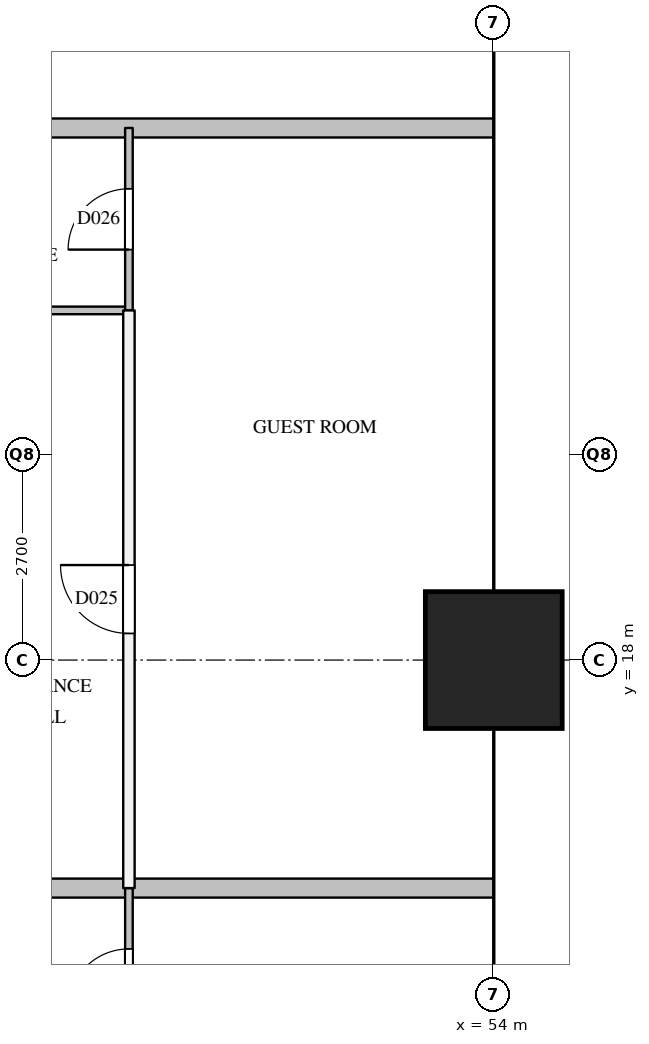
"""IFC4 building model, lengths in metres.
Left out: names, types, materials, properties, quantities, classifications, styles, units other than length and angle.
Written with IfcOpenShell. Run it as: python <this file> out.ifc"""

import sys

from ifc_helpers import new_model, si_unit, direction, frame, frame_2d, origin, origin_2d, place, context, subcontext, project, spatial, rectangle, extrude, element, fill, save


model = new_model("IFC4")
c1 = context("Model", 3, precision=1e-05, world=origin(), true_north=direction((0.0, 1.0)))
c2 = subcontext(c1, "Body", "Model", "MODEL_VIEW")
j1 = project(units=[si_unit("LENGTHUNIT", "METRE"), si_unit("PLANEANGLEUNIT", "RADIAN")], contexts=[c1])
p1 = place(None, origin())
s1 = spatial("IfcSite", under=j1, at=p1, CompositionType="ELEMENT")
p2 = place(p1, origin())
s2 = spatial("IfcBuilding", under=s1, at=p2, CompositionType="ELEMENT")
p3 = place(p2, frame((0.0, 0.0, 72.8)))
s3 = spatial("IfcBuildingStorey", under=s2, at=p3, CompositionType="ELEMENT", Elevation=72.8)
p4 = place(p3, frame((54.0, 18.0, 0.0), z_axis=(0.0, 0.0, 1.0), x_axis=(1.0, 0.0, 0.0)))
e1 = element("IfcColumn", 1, at=p4, inside=s3, PredefinedType="COLUMN", context=c2, shape_type="SweptSolid", body=[
    extrude(rectangle(XDim=1.8, YDim=1.8, at=origin_2d()), origin(), (0.0, 0.0, 1.0), 5.0),
])
p5 = place(p3, frame((49.2, 15.0, 0.0), z_axis=(0.0, 0.0, 1.0), x_axis=(0.0, 1.0, 0.0)))
e2 = element("IfcWall", 2, at=p5, inside=s3, PredefinedType="PARTITIONING", context=c2, shape_type="SweptSolid", body=[
    extrude(rectangle(XDim=7.6, YDim=0.15, at=frame_2d((3.8, 0.0))), origin(), (0.0, 0.0, 1.0), 4.7),
])
p6 = place(p5, frame((3.35, 0.0, 0.0)))
e3 = element("IfcOpeningElement", 3, at=p6, cuts=e2, PredefinedType="OPENING", context=c2, shape_type="SweptSolid", body=[
    extrude(rectangle(XDim=0.9, YDim=2.1, at=frame_2d((0.45, 1.05))), frame((0.0, 0.085, 0.0), z_axis=(0.0, -1.0, 0.0), x_axis=(1.0, 0.0, 0.0)), (0.0, 0.0, 1.0), 0.17),
])
p7 = place(p3, frame((46.8, 15.0, 0.0), z_axis=(0.0, 0.0, 1.0), x_axis=(1.0, 0.0, 0.0)))
e4 = element("IfcWall", 4, at=p7, inside=s3, PredefinedType="PARTITIONING", context=c2, shape_type="SweptSolid", body=[
    extrude(rectangle(XDim=7.2, YDim=0.25, at=frame_2d((3.6, 0.0))), origin(), (0.0, 0.0, 1.0), 3.7),
])
p8 = place(p3, frame((47.32, 25.0, 0.0), z_axis=(0.0, 0.0, 1.0), x_axis=(1.0, 0.0, 0.0)))
e5 = element("IfcWall", 5, at=p8, inside=s3, PredefinedType="PARTITIONING", context=c2, shape_type="SweptSolid", body=[
    extrude(rectangle(XDim=6.68, YDim=0.25, at=frame_2d((3.34, 0.0))), origin(), (0.0, 0.0, 1.0), 3.7),
])
p9 = place(p3, frame((46.8, 22.6, 0.0), z_axis=(0.0, 0.0, 1.0), x_axis=(1.0, 0.0, 0.0)))
e6 = element("IfcWall", 6, at=p9, inside=s3, PredefinedType="PARTITIONING", context=c2, shape_type="SweptSolid", body=[
    extrude(rectangle(XDim=2.4, YDim=0.1, at=frame_2d((1.2, 0.0))), origin(), (0.0, 0.0, 1.0), 4.7),
])
p10 = place(p3, frame((49.2, 12.6, 0.0), z_axis=(0.0, 0.0, 1.0), x_axis=(0.0, 1.0, 0.0)))
e7 = element("IfcWall", 7, at=p10, inside=s3, PredefinedType="PARTITIONING", context=c2, shape_type="SweptSolid", body=[
    extrude(rectangle(XDim=2.4, YDim=0.1, at=frame_2d((1.2, 0.0))), origin(), (0.0, 0.0, 1.0), 4.7),
])
p11 = place(p10, frame((0.8, 0.0, 0.0)))
e8 = element("IfcOpeningElement", 8, at=p11, cuts=e7, PredefinedType="OPENING", context=c2, shape_type="SweptSolid", body=[
    extrude(rectangle(XDim=0.8, YDim=2.1, at=frame_2d((0.4, 1.05))), frame((0.0, 0.06, 0.0), z_axis=(0.0, -1.0, 0.0), x_axis=(1.0, 0.0, 0.0)), (0.0, 0.0, 1.0), 0.12),
])
p12 = place(p3, frame((49.2, 22.6, 0.0), z_axis=(0.0, 0.0, 1.0), x_axis=(0.0, 1.0, 0.0)))
e9 = element("IfcWall", 9, at=p12, inside=s3, PredefinedType="PARTITIONING", context=c2, shape_type="SweptSolid", body=[
    extrude(rectangle(XDim=2.4, YDim=0.1, at=frame_2d((1.2, 0.0))), origin(), (0.0, 0.0, 1.0), 4.7),
])
p13 = place(p12, frame((0.8, 0.0, 0.0)))
e10 = element("IfcOpeningElement", 10, at=p13, cuts=e9, PredefinedType="OPENING", context=c2, shape_type="SweptSolid", body=[
    extrude(rectangle(XDim=0.8, YDim=2.1, at=frame_2d((0.4, 1.05))), frame((0.0, 0.06, 0.0), z_axis=(0.0, -1.0, 0.0), x_axis=(1.0, 0.0, 0.0)), (0.0, 0.0, 1.0), 0.12),
])
p14 = place(p11, origin())
e11 = element("IfcDoor", 11, at=p14, inside=s3, OperationType="SINGLE_SWING_LEFT", PredefinedType="DOOR", context=c2, shape_type="SweptSolid", body=[
    extrude(rectangle(XDim=0.8, YDim=2.1, at=frame_2d((0.4, 1.05))), frame((0.0, 0.025, 0.0), z_axis=(0.0, -1.0, 0.0), x_axis=(1.0, 0.0, 0.0)), (0.0, 0.0, 1.0), 0.05),
])
fill(e8, e11)
p15 = place(p6, origin())
e12 = element("IfcDoor", 12, at=p15, inside=s3, OperationType="SINGLE_SWING_RIGHT", PredefinedType="DOOR", context=c2, shape_type="SweptSolid", body=[
    extrude(rectangle(XDim=0.9, YDim=2.1, at=frame_2d((0.45, 1.05))), frame((0.0, 0.025, 0.0), z_axis=(0.0, -1.0, 0.0), x_axis=(1.0, 0.0, 0.0)), (0.0, 0.0, 1.0), 0.05),
])
fill(e3, e12)
p16 = place(p13, origin())
e13 = element("IfcDoor", 13, at=p16, inside=s3, OperationType="SINGLE_SWING_LEFT", PredefinedType="DOOR", context=c2, shape_type="SweptSolid", body=[
    extrude(rectangle(XDim=0.8, YDim=2.1, at=frame_2d((0.4, 1.05))), frame((0.0, 0.025, 0.0), z_axis=(0.0, -1.0, 0.0), x_axis=(1.0, 0.0, 0.0)), (0.0, 0.0, 1.0), 0.05),
])
fill(e10, e13)
save(model, sys.argv[1])
